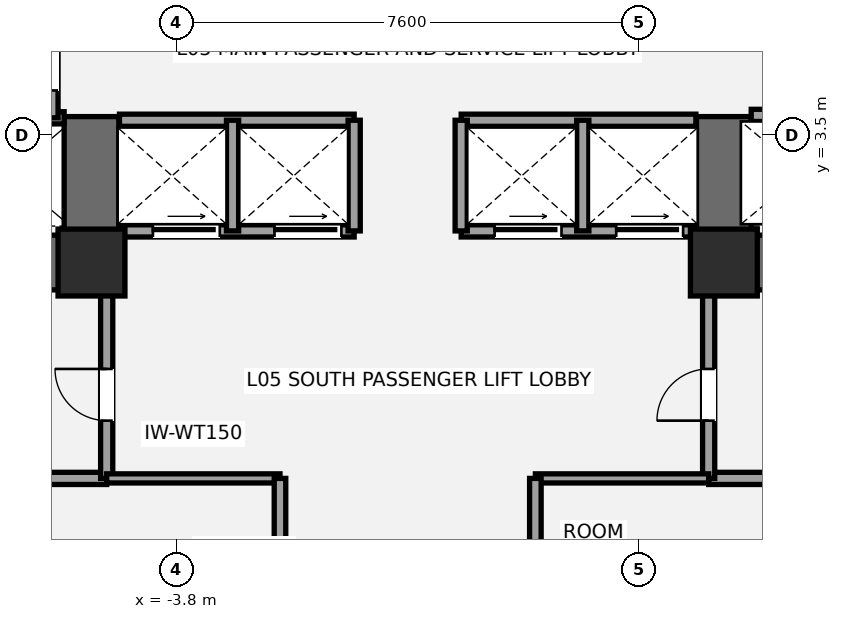
"""IFC4 building model, lengths in metres.
Left out: names, types, materials, properties, quantities, classifications, styles, units other than length and angle.
Written with IfcOpenShell. Run it as: python <this file> out.ifc"""

import sys

from ifc_helpers import new_model, si_unit, direction, frame, frame_2d, origin, origin_2d, place, context, subcontext, project, spatial, rectangle, extrude, element, fill, save


model = new_model("IFC4")
c1 = context("Model", 3, precision=1e-05, world=origin(), true_north=direction((0.0, 1.0)))
c2 = subcontext(c1, "Body", "Model", "MODEL_VIEW")
j1 = project(units=[si_unit("LENGTHUNIT", "METRE"), si_unit("PLANEANGLEUNIT", "RADIAN")], contexts=[c1])
p1 = place(None, origin())
s1 = spatial("IfcSite", under=j1, at=p1, CompositionType="ELEMENT")
p2 = place(p1, origin())
s2 = spatial("IfcBuilding", under=s1, at=p2, CompositionType="ELEMENT")
p3 = place(p2, frame((0.0, 0.0, 22.8)))
s3 = spatial("IfcBuildingStorey", under=s2, at=p3, CompositionType="ELEMENT", Elevation=22.8)
p4 = place(p3, frame((-4.75, 1.4, 0.0), z_axis=(0.0, 0.0, 1.0), x_axis=(-1.0, 0.0, 0.0)))
e1 = element("IfcWall", 1, at=p4, inside=s3, PredefinedType="SHEAR", context=c2, shape_type="SweptSolid", body=[
    extrude(rectangle(XDim=9.3, YDim=0.9, at=frame_2d((4.65, 0.0))), origin(), (0.0, 0.0, 1.0), 4.2),
])
p5 = place(p4, frame((5.55, 0.0, 0.0)))
e2 = element("IfcOpeningElement", 2, at=p5, cuts=e1, PredefinedType="OPENING", context=c2, shape_type="SweptSolid", body=[
    extrude(rectangle(XDim=1.05, YDim=2.15, at=frame_2d((0.525, 1.075))), frame((0.0, 0.46, 0.0), z_axis=(0.0, -1.0, 0.0), x_axis=(1.0, 0.0, 0.0)), (0.0, 0.0, 1.0), 0.92),
])
p6 = place(p4, frame((3.88, 0.0, 0.0)))
e3 = element("IfcOpeningElement", 3, at=p6, cuts=e1, PredefinedType="OPENING", context=c2, shape_type="SweptSolid", body=[
    extrude(rectangle(XDim=1.1, YDim=2.2, at=frame_2d((0.55, 1.1))), frame((0.0, 0.46, 0.0), z_axis=(0.0, -1.0, 0.0), x_axis=(1.0, 0.0, 0.0)), (0.0, 0.0, 1.0), 0.92),
])
p7 = place(p3, frame((-5.2, 0.95, 0.0), z_axis=(0.0, 0.0, 1.0), x_axis=(0.0, 1.0, 0.0)))
e4 = element("IfcWall", 4, at=p7, inside=s3, PredefinedType="SHEAR", context=c2, shape_type="SweptSolid", body=[
    extrude(rectangle(XDim=2.85, YDim=0.9, at=frame_2d((1.425, 0.0))), origin(), (0.0, 0.0, 1.0), 4.2),
])
p8 = place(p3, frame((14.05, 1.4, 0.0), z_axis=(0.0, 0.0, 1.0), x_axis=(-1.0, 0.0, 0.0)))
e5 = element("IfcWall", 5, at=p8, inside=s3, PredefinedType="SHEAR", context=c2, shape_type="SweptSolid", body=[
    extrude(rectangle(XDim=9.3, YDim=0.9, at=frame_2d((4.65, 0.0))), origin(), (0.0, 0.0, 1.0), 4.2),
])
p9 = place(p8, frame((2.7, 0.0, 0.0)))
e6 = element("IfcOpeningElement", 6, at=p9, cuts=e5, PredefinedType="OPENING", context=c2, shape_type="SweptSolid", body=[
    extrude(rectangle(XDim=1.05, YDim=2.15, at=frame_2d((0.525, 1.075))), frame((0.0, 0.46, 0.0), z_axis=(0.0, -1.0, 0.0), x_axis=(1.0, 0.0, 0.0)), (0.0, 0.0, 1.0), 0.92),
])
p10 = place(p8, frame((4.7, 0.0, 0.0)))
e7 = element("IfcOpeningElement", 7, at=p10, cuts=e5, PredefinedType="OPENING", context=c2, shape_type="SweptSolid", body=[
    extrude(rectangle(XDim=1.1, YDim=2.2, at=frame_2d((0.55, 1.1))), frame((0.0, 0.46, 0.0), z_axis=(0.0, -1.0, 0.0), x_axis=(1.0, 0.0, 0.0)), (0.0, 0.0, 1.0), 0.92),
])
p11 = place(p3, frame((5.2, 0.95, 0.0), z_axis=(0.0, 0.0, 1.0), x_axis=(0.0, 1.0, 0.0)))
e8 = element("IfcWall", 8, at=p11, inside=s3, PredefinedType="SHEAR", context=c2, shape_type="SweptSolid", body=[
    extrude(rectangle(XDim=2.85, YDim=0.9, at=frame_2d((1.425, 0.0))), origin(), (0.0, 0.0, 1.0), 4.2),
])
for number, where, z_axis, x_axis in (
    (9, (-5.2, 1.4, 0.0), (0.0, 0.0, 1.0), (1.0, 0.0, 0.0)),
    (10, (5.2, 1.4, 0.0), (0.0, 0.0, 1.0), (1.0, 0.0, 0.0)),
):
    element("IfcColumn", number, at=place(p3, frame(where, z_axis=z_axis, x_axis=x_axis)), inside=s3, PredefinedType="COLUMN", context=c2, shape_type="SweptSolid", body=[
        extrude(rectangle(XDim=1.1, YDim=1.1, at=origin_2d()), origin(), (0.0, 0.0, 1.0), 4.2),
    ])
p12 = place(p3, frame((-7.2, -2.15, 0.0), z_axis=(0.0, 0.0, 1.0), x_axis=(1.0, 0.0, 0.0)))
e11 = element("IfcWall", 11, at=p12, inside=s3, PredefinedType="SOLIDWALL", context=c2, shape_type="SweptSolid", body=[
    extrude(rectangle(XDim=2.25, YDim=0.2, at=frame_2d((1.125, 0.0))), origin(), (0.0, 0.0, 1.0), 2.09),
])
p13 = place(p3, frame((-4.95, -2.15, 0.0), z_axis=(0.0, 0.0, 1.0), x_axis=(0.0, 1.0, 0.0)))
e12 = element("IfcWall", 12, at=p13, inside=s3, PredefinedType="SOLIDWALL", context=c2, shape_type="SweptSolid", body=[
    extrude(rectangle(XDim=3.15, YDim=0.2, at=frame_2d((1.575, 0.0))), origin(), (0.0, 0.0, 1.0), 2.09),
])
p14 = place(p13, frame((0.95, 0.0, 0.0)))
e13 = element("IfcOpeningElement", 13, at=p14, cuts=e12, PredefinedType="OPENING", context=c2, shape_type="SweptSolid", body=[
    extrude(rectangle(XDim=0.85, YDim=2.0, at=frame_2d((0.425, 1.0))), frame((0.0, 0.11, 0.0), z_axis=(0.0, -1.0, 0.0), x_axis=(1.0, 0.0, 0.0)), (0.0, 0.0, 1.0), 0.22),
])
p15 = place(p3, frame((4.95, -2.15, 0.0), z_axis=(0.0, 0.0, 1.0), x_axis=(1.0, 0.0, 0.0)))
e14 = element("IfcWall", 14, at=p15, inside=s3, PredefinedType="SOLIDWALL", context=c2, shape_type="SweptSolid", body=[
    extrude(rectangle(XDim=2.25, YDim=0.2, at=frame_2d((1.125, 0.0))), origin(), (0.0, 0.0, 1.0), 2.09),
])
p16 = place(p3, frame((4.95, -2.15, 0.0), z_axis=(0.0, 0.0, 1.0), x_axis=(0.0, 1.0, 0.0)))
e15 = element("IfcWall", 15, at=p16, inside=s3, PredefinedType="SOLIDWALL", context=c2, shape_type="SweptSolid", body=[
    extrude(rectangle(XDim=3.15, YDim=0.2, at=frame_2d((1.575, 0.0))), origin(), (0.0, 0.0, 1.0), 2.09),
])
p17 = place(p16, frame((0.95, 0.0, 0.0)))
e16 = element("IfcOpeningElement", 16, at=p17, cuts=e15, PredefinedType="OPENING", context=c2, shape_type="SweptSolid", body=[
    extrude(rectangle(XDim=0.85, YDim=2.0, at=frame_2d((0.425, 1.0))), frame((0.0, 0.11, 0.0), z_axis=(0.0, -1.0, 0.0), x_axis=(1.0, 0.0, 0.0)), (0.0, 0.0, 1.0), 0.22),
])
p18 = place(p3, frame((-9.78, 3.78, 0.0), z_axis=(0.0, 0.0, 1.0), x_axis=(1.0, 0.0, 0.0)))
e17 = element("IfcWall", 17, at=p18, inside=s3, PredefinedType="SOLIDWALL", context=c2, shape_type="SweptSolid", body=[
    extrude(rectangle(XDim=4.13, YDim=0.2, at=frame_2d((2.065, 0.0))), origin(), (0.0, 0.0, 1.0), 3.9),
])
p19 = place(p3, frame((-5.85, 3.78, 0.0), z_axis=(0.0, 0.0, 1.0), x_axis=(0.0, 1.0, 0.0)))
e18 = element("IfcWall", 18, at=p19, inside=s3, PredefinedType="SOLIDWALL", context=c2, shape_type="SweptSolid", body=[
    extrude(rectangle(XDim=1.69, YDim=0.2, at=frame_2d((0.845, 0.0))), origin(), (0.0, 0.0, 1.0), 3.9),
])
p20 = place(p19, frame((0.45, 0.0, 0.0)))
e19 = element("IfcOpeningElement", 19, at=p20, cuts=e18, PredefinedType="OPENING", context=c2, shape_type="SweptSolid", body=[
    extrude(rectangle(XDim=0.75, YDim=2.1, at=frame_2d((0.375, 1.05))), frame((0.0, 0.11, 0.0), z_axis=(0.0, -1.0, 0.0), x_axis=(1.0, 0.0, 0.0)), (0.0, 0.0, 1.0), 0.22),
])
p21 = place(p3, frame((5.65, 3.82, 0.0), z_axis=(0.0, 0.0, 1.0), x_axis=(1.0, 0.0, 0.0)))
e20 = element("IfcWall", 20, at=p21, inside=s3, PredefinedType="SOLIDWALL", context=c2, shape_type="SweptSolid", body=[
    extrude(rectangle(XDim=4.13, YDim=0.2, at=frame_2d((2.065, 0.0))), origin(), (0.0, 0.0, 1.0), 3.9),
])
p22 = place(p21, frame((0.65, 0.0, 0.0)))
e21 = element("IfcOpeningElement", 21, at=p22, cuts=e20, PredefinedType="OPENING", context=c2, shape_type="SweptSolid", body=[
    extrude(rectangle(XDim=1.2, YDim=2.2, at=frame_2d((0.6, 1.1))), frame((0.0, 0.11, 0.0), z_axis=(0.0, -1.0, 0.0), x_axis=(1.0, 0.0, 0.0)), (0.0, 0.0, 1.0), 0.22),
])
p23 = place(p3, frame((-4.74, 1.92, 0.0), z_axis=(0.0, 0.0, 1.0), x_axis=(1.0, 0.0, 0.0)))
e22 = element("IfcWall", 22, at=p23, inside=s3, PredefinedType="SOLIDWALL", context=c2, shape_type="SweptSolid", body=[
    extrude(rectangle(XDim=3.86, YDim=0.2, at=frame_2d((1.93, 0.0))), origin(), (0.0, 0.0, 1.0), 2.89),
])
p24 = place(p23, frame((0.55, 0.0, 0.0)))
e23 = element("IfcOpeningElement", 23, at=p24, cuts=e22, PredefinedType="OPENING", context=c2, shape_type="SweptSolid", body=[
    extrude(rectangle(XDim=1.1, YDim=2.2, at=frame_2d((0.55, 1.1))), frame((0.0, 0.11, 0.0), z_axis=(0.0, -1.0, 0.0), x_axis=(1.0, 0.0, 0.0)), (0.0, 0.0, 1.0), 0.22),
])
p25 = place(p23, frame((2.55, 0.0, 0.0)))
e24 = element("IfcOpeningElement", 24, at=p25, cuts=e22, PredefinedType="OPENING", context=c2, shape_type="SweptSolid", body=[
    extrude(rectangle(XDim=1.1, YDim=2.2, at=frame_2d((0.55, 1.1))), frame((0.0, 0.11, 0.0), z_axis=(0.0, -1.0, 0.0), x_axis=(1.0, 0.0, 0.0)), (0.0, 0.0, 1.0), 0.22),
])
p26 = place(p3, frame((0.88, 1.92, 0.0), z_axis=(0.0, 0.0, 1.0), x_axis=(1.0, 0.0, 0.0)))
e25 = element("IfcWall", 25, at=p26, inside=s3, PredefinedType="SOLIDWALL", context=c2, shape_type="SweptSolid", body=[
    extrude(rectangle(XDim=3.86, YDim=0.2, at=frame_2d((1.93, 0.0))), origin(), (0.0, 0.0, 1.0), 2.89),
])
p27 = place(p26, frame((0.55, 0.0, 0.0)))
e26 = element("IfcOpeningElement", 26, at=p27, cuts=e25, PredefinedType="OPENING", context=c2, shape_type="SweptSolid", body=[
    extrude(rectangle(XDim=1.1, YDim=2.2, at=frame_2d((0.55, 1.1))), frame((0.0, 0.11, 0.0), z_axis=(0.0, -1.0, 0.0), x_axis=(1.0, 0.0, 0.0)), (0.0, 0.0, 1.0), 0.22),
])
p28 = place(p26, frame((2.55, 0.0, 0.0)))
e27 = element("IfcOpeningElement", 27, at=p28, cuts=e25, PredefinedType="OPENING", context=c2, shape_type="SweptSolid", body=[
    extrude(rectangle(XDim=1.1, YDim=2.2, at=frame_2d((0.55, 1.1))), frame((0.0, 0.11, 0.0), z_axis=(0.0, -1.0, 0.0), x_axis=(1.0, 0.0, 0.0)), (0.0, 0.0, 1.0), 0.22),
])
for number, where, z_axis, x_axis in (
    (28, (-4.74, 3.74, 0.0), (0.0, 0.0, 1.0), (1.0, 0.0, 0.0)),
    (29, (0.88, 3.74, 0.0), (0.0, 0.0, 1.0), (1.0, 0.0, 0.0)),
):
    element("IfcWall", number, at=place(p3, frame(where, z_axis=z_axis, x_axis=x_axis)), inside=s3, PredefinedType="SOLIDWALL", context=c2, shape_type="SweptSolid", body=[
        extrude(rectangle(XDim=3.86, YDim=0.2, at=frame_2d((1.93, 0.0))), origin(), (0.0, 0.0, 1.0), 3.9),
    ])
for number, where, z_axis, x_axis in (
    (30, (-2.88, 1.92, 0.0), (0.0, 0.0, 1.0), (0.0, 1.0, 0.0)),
    (31, (2.88, 1.92, 0.0), (0.0, 0.0, 1.0), (0.0, 1.0, 0.0)),
    (32, (-0.88, 1.92, 0.0), (0.0, 0.0, 1.0), (0.0, 1.0, 0.0)),
    (33, (0.88, 1.92, 0.0), (0.0, 0.0, 1.0), (0.0, 1.0, 0.0)),
):
    element("IfcWall", number, at=place(p3, frame(where, z_axis=z_axis, x_axis=x_axis)), inside=s3, PredefinedType="SOLIDWALL", context=c2, shape_type="SweptSolid", body=[
        extrude(rectangle(XDim=1.82, YDim=0.2, at=frame_2d((0.91, 0.0))), origin(), (0.0, 0.0, 1.0), 3.9),
    ])
p29 = place(p3, frame((-4.95, -2.15, 0.0), z_axis=(0.0, 0.0, 1.0), x_axis=(1.0, 0.0, 0.0)))
e34 = element("IfcWall", 34, at=p29, inside=s3, PredefinedType="PLUMBINGWALL", context=c2, shape_type="SweptSolid", body=[
    extrude(rectangle(XDim=2.85, YDim=0.15, at=frame_2d((1.425, 0.0))), origin(), (0.0, 0.0, 1.0), 3.9),
])
p30 = place(p3, frame((-2.1, -4.05, 0.0), z_axis=(0.0, 0.0, 1.0), x_axis=(0.0, 1.0, 0.0)))
e35 = element("IfcWall", 35, at=p30, inside=s3, PredefinedType="PLUMBINGWALL", context=c2, shape_type="SweptSolid", body=[
    extrude(rectangle(XDim=1.9, YDim=0.19, at=frame_2d((0.95, 0.0))), origin(), (0.0, 0.0, 1.0), 3.9),
])
p31 = place(p3, frame((2.1, -2.15, 0.0), z_axis=(0.0, 0.0, 1.0), x_axis=(1.0, 0.0, 0.0)))
e36 = element("IfcWall", 36, at=p31, inside=s3, PredefinedType="PLUMBINGWALL", context=c2, shape_type="SweptSolid", body=[
    extrude(rectangle(XDim=2.85, YDim=0.15, at=frame_2d((1.425, 0.0))), origin(), (0.0, 0.0, 1.0), 3.9),
])
p32 = place(p3, frame((2.1, -4.05, 0.0), z_axis=(0.0, 0.0, 1.0), x_axis=(0.0, 1.0, 0.0)))
e37 = element("IfcWall", 37, at=p32, inside=s3, PredefinedType="PLUMBINGWALL", context=c2, shape_type="SweptSolid", body=[
    extrude(rectangle(XDim=1.9, YDim=0.19, at=frame_2d((0.95, 0.0))), origin(), (0.0, 0.0, 1.0), 3.9),
])
p33 = place(p14, origin())
e38 = element("IfcDoor", 38, at=p33, inside=s3, OperationType="SINGLE_SWING_RIGHT", PredefinedType="DOOR", context=c2, shape_type="SweptSolid", body=[
    extrude(rectangle(XDim=0.85, YDim=2.0, at=frame_2d((0.425, 1.0))), frame((0.0, 0.025, 0.0), z_axis=(0.0, -1.0, 0.0), x_axis=(1.0, 0.0, 0.0)), (0.0, 0.0, 1.0), 0.05),
])
fill(e13, e38)
p34 = place(p17, origin())
e39 = element("IfcDoor", 39, at=p34, inside=s3, OperationType="SINGLE_SWING_LEFT", PredefinedType="DOOR", context=c2, shape_type="SweptSolid", body=[
    extrude(rectangle(XDim=0.85, YDim=2.0, at=frame_2d((0.425, 1.0))), frame((0.0, 0.025, 0.0), z_axis=(0.0, -1.0, 0.0), x_axis=(1.0, 0.0, 0.0)), (0.0, 0.0, 1.0), 0.05),
])
fill(e16, e39)
p35 = place(p20, origin())
e40 = element("IfcDoor", 40, at=p35, inside=s3, OperationType="SINGLE_SWING_RIGHT", PredefinedType="DOOR", context=c2, shape_type="SweptSolid", body=[
    extrude(rectangle(XDim=0.75, YDim=2.1, at=frame_2d((0.375, 1.05))), frame((0.0, 0.025, 0.0), z_axis=(0.0, -1.0, 0.0), x_axis=(1.0, 0.0, 0.0)), (0.0, 0.0, 1.0), 0.05),
])
fill(e19, e40)
p36 = place(p24, origin())
e41 = element("IfcDoor", 41, at=p36, inside=s3, OperationType="SLIDING_TO_LEFT", PredefinedType="DOOR", context=c2, shape_type="SweptSolid", body=[
    extrude(rectangle(XDim=1.1, YDim=2.2, at=frame_2d((0.55, 1.1))), frame((0.0, 0.025, 0.0), z_axis=(0.0, -1.0, 0.0), x_axis=(1.0, 0.0, 0.0)), (0.0, 0.0, 1.0), 0.05),
])
fill(e23, e41)
p37 = place(p25, origin())
e42 = element("IfcDoor", 42, at=p37, inside=s3, OperationType="SLIDING_TO_LEFT", PredefinedType="DOOR", context=c2, shape_type="SweptSolid", body=[
    extrude(rectangle(XDim=1.1, YDim=2.2, at=frame_2d((0.55, 1.1))), frame((0.0, 0.025, 0.0), z_axis=(0.0, -1.0, 0.0), x_axis=(1.0, 0.0, 0.0)), (0.0, 0.0, 1.0), 0.05),
])
fill(e24, e42)
p38 = place(p27, origin())
e43 = element("IfcDoor", 43, at=p38, inside=s3, OperationType="SLIDING_TO_LEFT", PredefinedType="DOOR", context=c2, shape_type="SweptSolid", body=[
    extrude(rectangle(XDim=1.1, YDim=2.2, at=frame_2d((0.55, 1.1))), frame((0.0, 0.025, 0.0), z_axis=(0.0, -1.0, 0.0), x_axis=(1.0, 0.0, 0.0)), (0.0, 0.0, 1.0), 0.05),
])
fill(e26, e43)
p39 = place(p28, origin())
e44 = element("IfcDoor", 44, at=p39, inside=s3, OperationType="SLIDING_TO_LEFT", PredefinedType="DOOR", context=c2, shape_type="SweptSolid", body=[
    extrude(rectangle(XDim=1.1, YDim=2.2, at=frame_2d((0.55, 1.1))), frame((0.0, 0.025, 0.0), z_axis=(0.0, -1.0, 0.0), x_axis=(1.0, 0.0, 0.0)), (0.0, 0.0, 1.0), 0.05),
])
fill(e27, e44)
save(model, sys.argv[1])
